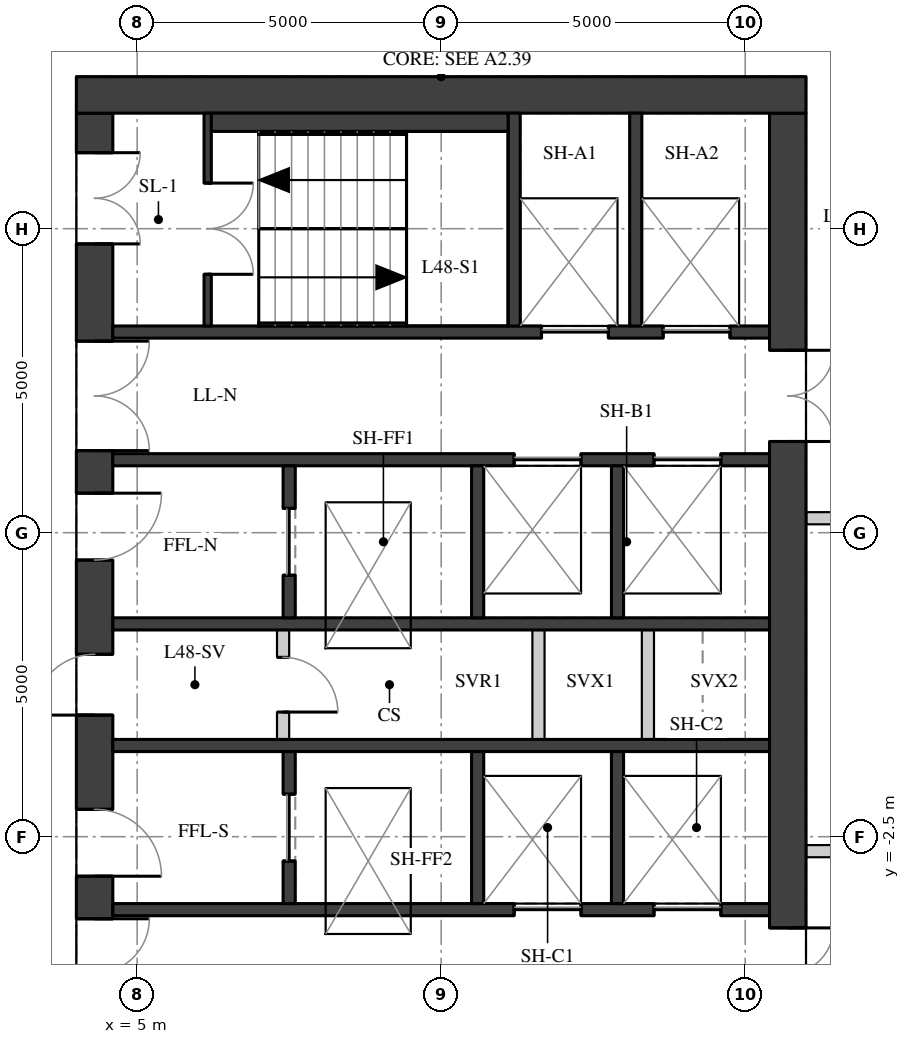
"""IFC4 building model, lengths in metres.
Left out: names, types, materials, properties, quantities, classifications, styles, units other than length and angle.
Written with IfcOpenShell. Run it as: python <this file> out.ifc"""

import sys

from ifc_helpers import new_model, si_unit, direction, frame, frame_2d, origin, place, context, subcontext, project, spatial, rectangle, extrude, element, fill, save


model = new_model("IFC4")
c1 = context("Model", 3, precision=1e-05, world=origin(), true_north=direction((0.0, 1.0)))
c2 = subcontext(c1, "Body", "Model", "MODEL_VIEW")
j1 = project(units=[si_unit("LENGTHUNIT", "METRE"), si_unit("PLANEANGLEUNIT", "RADIAN")], contexts=[c1])
p1 = place(None, origin())
s1 = spatial("IfcSite", under=j1, at=p1, CompositionType="ELEMENT")
p2 = place(p1, origin())
s2 = spatial("IfcBuilding", under=s1, at=p2, CompositionType="ELEMENT")
p3 = place(p2, frame((0.0, 0.0, 171.5)))
s3 = spatial("IfcBuildingStorey", under=s2, at=p3, CompositionType="ELEMENT", Elevation=171.5)
p4 = place(p3, frame((4.3, -9.4, 0.0), z_axis=(0.0, 0.0, 1.0), x_axis=(0.0, 1.0, 0.0)))
e1 = element("IfcWall", 1, at=p4, inside=s3, PredefinedType="SHEAR", context=c2, shape_type="SweptSolid", body=[
    extrude(rectangle(XDim=18.8, YDim=0.6, at=frame_2d((9.4, 0.0))), origin(), (0.0, 0.0, 1.0), 3.02),
])
p5 = place(p4, frame((0.65, 0.0, 0.0)))
e2 = element("IfcOpeningElement", 2, at=p5, cuts=e1, PredefinedType="OPENING", context=c2, shape_type="SweptSolid", body=[
    extrude(rectangle(XDim=1.5, YDim=2.1, at=frame_2d((0.75, 1.05))), frame((0.0, 0.31, 0.0), z_axis=(0.0, -1.0, 0.0), x_axis=(1.0, 0.0, 0.0)), (0.0, 0.0, 1.0), 0.62),
])
p6 = place(p4, frame((3.75, 0.0, 0.0)))
e3 = element("IfcOpeningElement", 3, at=p6, cuts=e1, PredefinedType="OPENING", context=c2, shape_type="SweptSolid", body=[
    extrude(rectangle(XDim=1.8, YDim=2.1, at=frame_2d((0.9, 1.05))), frame((0.0, 0.31, 0.0), z_axis=(0.0, -1.0, 0.0), x_axis=(1.0, 0.0, 0.0)), (0.0, 0.0, 1.0), 0.62),
])
p7 = place(p4, frame((6.25, 0.0, 0.0)))
e4 = element("IfcOpeningElement", 4, at=p7, cuts=e1, PredefinedType="OPENING", context=c2, shape_type="SweptSolid", body=[
    extrude(rectangle(XDim=1.1, YDim=2.1, at=frame_2d((0.55, 1.05))), frame((0.0, 0.31, 0.0), z_axis=(0.0, -1.0, 0.0), x_axis=(1.0, 0.0, 0.0)), (0.0, 0.0, 1.0), 0.62),
])
p8 = place(p4, frame((8.9, 0.0, 0.0)))
e5 = element("IfcOpeningElement", 5, at=p8, cuts=e1, PredefinedType="OPENING", context=c2, shape_type="SweptSolid", body=[
    extrude(rectangle(XDim=1.0, YDim=2.1, at=frame_2d((0.5, 1.05))), frame((0.0, 0.31, 0.0), z_axis=(0.0, -1.0, 0.0), x_axis=(1.0, 0.0, 0.0)), (0.0, 0.0, 1.0), 0.62),
])
p9 = place(p4, frame((11.45, 0.0, 0.0)))
e6 = element("IfcOpeningElement", 6, at=p9, cuts=e1, PredefinedType="OPENING", context=c2, shape_type="SweptSolid", body=[
    extrude(rectangle(XDim=1.1, YDim=2.1, at=frame_2d((0.55, 1.05))), frame((0.0, 0.31, 0.0), z_axis=(0.0, -1.0, 0.0), x_axis=(1.0, 0.0, 0.0)), (0.0, 0.0, 1.0), 0.62),
])
p10 = place(p4, frame((13.25, 0.0, 0.0)))
e7 = element("IfcOpeningElement", 7, at=p10, cuts=e1, PredefinedType="OPENING", context=c2, shape_type="SweptSolid", body=[
    extrude(rectangle(XDim=1.8, YDim=2.1, at=frame_2d((0.9, 1.05))), frame((0.0, 0.31, 0.0), z_axis=(0.0, -1.0, 0.0), x_axis=(1.0, 0.0, 0.0)), (0.0, 0.0, 1.0), 0.62),
])
p11 = place(p4, frame((16.65, 0.0, 0.0)))
e8 = element("IfcOpeningElement", 8, at=p11, cuts=e1, PredefinedType="OPENING", context=c2, shape_type="SweptSolid", body=[
    extrude(rectangle(XDim=1.5, YDim=2.1, at=frame_2d((0.75, 1.05))), frame((0.0, 0.31, 0.0), z_axis=(0.0, -1.0, 0.0), x_axis=(1.0, 0.0, 0.0)), (0.0, 0.0, 1.0), 0.62),
])
p12 = place(p3, frame((15.7, -9.4, 0.0), z_axis=(0.0, 0.0, 1.0), x_axis=(0.0, 1.0, 0.0)))
e9 = element("IfcWall", 9, at=p12, inside=s3, PredefinedType="SHEAR", context=c2, shape_type="SweptSolid", body=[
    extrude(rectangle(XDim=18.8, YDim=0.6, at=frame_2d((9.4, 0.0))), origin(), (0.0, 0.0, 1.0), 3.02),
])
p13 = place(p12, frame((13.4, 0.0, 0.0)))
e10 = element("IfcOpeningElement", 10, at=p13, cuts=e9, PredefinedType="OPENING", context=c2, shape_type="SweptSolid", body=[
    extrude(rectangle(XDim=1.5, YDim=2.1, at=frame_2d((0.75, 1.05))), frame((0.0, 0.31, 0.0), z_axis=(0.0, -1.0, 0.0), x_axis=(1.0, 0.0, 0.0)), (0.0, 0.0, 1.0), 0.62),
])
p14 = place(p12, frame((3.9, 0.0, 0.0)))
e11 = element("IfcOpeningElement", 11, at=p14, cuts=e9, PredefinedType="OPENING", context=c2, shape_type="SweptSolid", body=[
    extrude(rectangle(XDim=1.5, YDim=2.1, at=frame_2d((0.75, 1.05))), frame((0.0, 0.31, 0.0), z_axis=(0.0, -1.0, 0.0), x_axis=(1.0, 0.0, 0.0)), (0.0, 0.0, 1.0), 0.62),
])
p15 = place(p3, frame((4.0, 9.7, 0.0), z_axis=(0.0, 0.0, 1.0), x_axis=(1.0, 0.0, 0.0)))
e12 = element("IfcWall", 12, at=p15, inside=s3, PredefinedType="SHEAR", context=c2, shape_type="SweptSolid", body=[
    extrude(rectangle(XDim=12.0, YDim=0.6, at=frame_2d((6.0, 0.0))), origin(), (0.0, 0.0, 1.0), 3.02),
])
p16 = place(p3, frame((4.6, 5.8, 0.0), z_axis=(0.0, 0.0, 1.0), x_axis=(1.0, 0.0, 0.0)))
e13 = element("IfcWall", 13, at=p16, inside=s3, PredefinedType="SHEAR", context=c2, shape_type="SweptSolid", body=[
    extrude(rectangle(XDim=10.8, YDim=0.2, at=frame_2d((5.4, 0.0))), origin(), (0.0, 0.0, 1.0), 3.02),
])
p17 = place(p16, frame((7.05, 0.0, 0.0)))
e14 = element("IfcOpeningElement", 14, at=p17, cuts=e13, PredefinedType="OPENING", context=c2, shape_type="SweptSolid", body=[
    extrude(rectangle(XDim=1.1, YDim=2.1, at=frame_2d((0.55, 1.05))), frame((0.0, 0.11, 0.0), z_axis=(0.0, -1.0, 0.0), x_axis=(1.0, 0.0, 0.0)), (0.0, 0.0, 1.0), 0.22),
])
p18 = place(p16, frame((9.05, 0.0, 0.0)))
e15 = element("IfcOpeningElement", 15, at=p18, cuts=e13, PredefinedType="OPENING", context=c2, shape_type="SweptSolid", body=[
    extrude(rectangle(XDim=1.1, YDim=2.1, at=frame_2d((0.55, 1.05))), frame((0.0, 0.11, 0.0), z_axis=(0.0, -1.0, 0.0), x_axis=(1.0, 0.0, 0.0)), (0.0, 0.0, 1.0), 0.22),
])
p19 = place(p3, frame((4.6, 3.7, 0.0), z_axis=(0.0, 0.0, 1.0), x_axis=(1.0, 0.0, 0.0)))
e16 = element("IfcWall", 16, at=p19, inside=s3, PredefinedType="SHEAR", context=c2, shape_type="SweptSolid", body=[
    extrude(rectangle(XDim=10.8, YDim=0.2, at=frame_2d((5.4, 0.0))), origin(), (0.0, 0.0, 1.0), 3.02),
])
p20 = place(p19, frame((6.6, 0.0, 0.0)))
e17 = element("IfcOpeningElement", 17, at=p20, cuts=e16, PredefinedType="OPENING", context=c2, shape_type="SweptSolid", body=[
    extrude(rectangle(XDim=1.1, YDim=2.1, at=frame_2d((0.55, 1.05))), frame((0.0, 0.11, 0.0), z_axis=(0.0, -1.0, 0.0), x_axis=(1.0, 0.0, 0.0)), (0.0, 0.0, 1.0), 0.22),
])
p21 = place(p19, frame((8.9, 0.0, 0.0)))
e18 = element("IfcOpeningElement", 18, at=p21, cuts=e16, PredefinedType="OPENING", context=c2, shape_type="SweptSolid", body=[
    extrude(rectangle(XDim=1.1, YDim=2.1, at=frame_2d((0.55, 1.05))), frame((0.0, 0.11, 0.0), z_axis=(0.0, -1.0, 0.0), x_axis=(1.0, 0.0, 0.0)), (0.0, 0.0, 1.0), 0.22),
])
for number, where, z_axis, x_axis in (
    (19, (4.6, 1.0, 0.0), (0.0, 0.0, 1.0), (1.0, 0.0, 0.0)),
    (20, (4.6, -1.0, 0.0), (0.0, 0.0, 1.0), (1.0, 0.0, 0.0)),
):
    element("IfcWall", number, at=place(p3, frame(where, z_axis=z_axis, x_axis=x_axis)), inside=s3, PredefinedType="SHEAR", context=c2, shape_type="SweptSolid", body=[
        extrude(rectangle(XDim=10.8, YDim=0.2, at=frame_2d((5.4, 0.0))), origin(), (0.0, 0.0, 1.0), 3.02),
    ])
p22 = place(p3, frame((4.6, -3.7, 0.0), z_axis=(0.0, 0.0, 1.0), x_axis=(1.0, 0.0, 0.0)))
e21 = element("IfcWall", 21, at=p22, inside=s3, PredefinedType="SHEAR", context=c2, shape_type="SweptSolid", body=[
    extrude(rectangle(XDim=10.8, YDim=0.2, at=frame_2d((5.4, 0.0))), origin(), (0.0, 0.0, 1.0), 3.02),
])
p23 = place(p22, frame((6.6, 0.0, 0.0)))
e22 = element("IfcOpeningElement", 22, at=p23, cuts=e21, PredefinedType="OPENING", context=c2, shape_type="SweptSolid", body=[
    extrude(rectangle(XDim=1.1, YDim=2.1, at=frame_2d((0.55, 1.05))), frame((0.0, 0.11, 0.0), z_axis=(0.0, -1.0, 0.0), x_axis=(1.0, 0.0, 0.0)), (0.0, 0.0, 1.0), 0.22),
])
p24 = place(p22, frame((8.9, 0.0, 0.0)))
e23 = element("IfcOpeningElement", 23, at=p24, cuts=e21, PredefinedType="OPENING", context=c2, shape_type="SweptSolid", body=[
    extrude(rectangle(XDim=1.1, YDim=2.1, at=frame_2d((0.55, 1.05))), frame((0.0, 0.11, 0.0), z_axis=(0.0, -1.0, 0.0), x_axis=(1.0, 0.0, 0.0)), (0.0, 0.0, 1.0), 0.22),
])
for number, where, z_axis, x_axis in (
    (24, (11.2, 5.9, 0.0), (0.0, 0.0, 1.0), (0.0, 1.0, 0.0)),
    (25, (13.2, 5.9, 0.0), (0.0, 0.0, 1.0), (0.0, 1.0, 0.0)),
):
    element("IfcWall", number, at=place(p3, frame(where, z_axis=z_axis, x_axis=x_axis)), inside=s3, PredefinedType="SHEAR", context=c2, shape_type="SweptSolid", body=[
        extrude(rectangle(XDim=3.5, YDim=0.2, at=frame_2d((1.75, 0.0))), origin(), (0.0, 0.0, 1.0), 3.02),
    ])
p25 = place(p3, frame((7.5, 1.1, 0.0), z_axis=(0.0, 0.0, 1.0), x_axis=(0.0, 1.0, 0.0)))
e26 = element("IfcWall", 26, at=p25, inside=s3, PredefinedType="SHEAR", context=c2, shape_type="SweptSolid", body=[
    extrude(rectangle(XDim=2.5, YDim=0.2, at=frame_2d((1.25, 0.0))), origin(), (0.0, 0.0, 1.0), 3.02),
])
p26 = place(p25, frame((0.7, 0.0, 0.0)))
e27 = element("IfcOpeningElement", 27, at=p26, cuts=e26, PredefinedType="OPENING", context=c2, shape_type="SweptSolid", body=[
    extrude(rectangle(XDim=1.1, YDim=2.1, at=frame_2d((0.55, 1.05))), frame((0.0, 0.11, 0.0), z_axis=(0.0, -1.0, 0.0), x_axis=(1.0, 0.0, 0.0)), (0.0, 0.0, 1.0), 0.22),
])
p27 = place(p3, frame((7.5, -3.6, 0.0), z_axis=(0.0, 0.0, 1.0), x_axis=(0.0, 1.0, 0.0)))
e28 = element("IfcWall", 28, at=p27, inside=s3, PredefinedType="SHEAR", context=c2, shape_type="SweptSolid", body=[
    extrude(rectangle(XDim=2.5, YDim=0.2, at=frame_2d((1.25, 0.0))), origin(), (0.0, 0.0, 1.0), 3.02),
])
p28 = place(p27, frame((0.7, 0.0, 0.0)))
e29 = element("IfcOpeningElement", 29, at=p28, cuts=e28, PredefinedType="OPENING", context=c2, shape_type="SweptSolid", body=[
    extrude(rectangle(XDim=1.1, YDim=2.1, at=frame_2d((0.55, 1.05))), frame((0.0, 0.11, 0.0), z_axis=(0.0, -1.0, 0.0), x_axis=(1.0, 0.0, 0.0)), (0.0, 0.0, 1.0), 0.22),
])
for number, where, z_axis, x_axis in (
    (30, (10.6, 1.1, 0.0), (0.0, 0.0, 1.0), (0.0, 1.0, 0.0)),
    (31, (10.6, -3.6, 0.0), (0.0, 0.0, 1.0), (0.0, 1.0, 0.0)),
    (32, (12.9, 1.1, 0.0), (0.0, 0.0, 1.0), (0.0, 1.0, 0.0)),
    (33, (12.9, -3.6, 0.0), (0.0, 0.0, 1.0), (0.0, 1.0, 0.0)),
):
    element("IfcWall", number, at=place(p3, frame(where, z_axis=z_axis, x_axis=x_axis)), inside=s3, PredefinedType="SHEAR", context=c2, shape_type="SweptSolid", body=[
        extrude(rectangle(XDim=2.5, YDim=0.2, at=frame_2d((1.25, 0.0))), origin(), (0.0, 0.0, 1.0), 3.02),
    ])
p29 = place(p3, frame((6.16, 5.9, 0.0), z_axis=(0.0, 0.0, 1.0), x_axis=(0.0, 1.0, 0.0)))
e34 = element("IfcWall", 34, at=p29, inside=s3, PredefinedType="SHEAR", context=c2, shape_type="SweptSolid", body=[
    extrude(rectangle(XDim=3.5, YDim=0.12, at=frame_2d((1.75, 0.0))), origin(), (0.0, 0.0, 1.0), 3.02),
])
p30 = place(p29, frame((0.85, 0.0, 0.0)))
e35 = element("IfcOpeningElement", 35, at=p30, cuts=e34, PredefinedType="OPENING", context=c2, shape_type="SweptSolid", body=[
    extrude(rectangle(XDim=1.5, YDim=2.1, at=frame_2d((0.75, 1.05))), frame((0.0, 0.07, 0.0), z_axis=(0.0, -1.0, 0.0), x_axis=(1.0, 0.0, 0.0)), (0.0, 0.0, 1.0), 0.14),
])
p31 = place(p3, frame((7.4, -0.9, 0.0), z_axis=(0.0, 0.0, 1.0), x_axis=(0.0, 1.0, 0.0)))
e36 = element("IfcWall", 36, at=p31, inside=s3, PredefinedType="PARTITIONING", context=c2, shape_type="SweptSolid", body=[
    extrude(rectangle(XDim=1.8, YDim=0.2, at=frame_2d((0.9, 0.0))), origin(), (0.0, 0.0, 1.0), 3.02),
])
p32 = place(p31, frame((0.45, 0.0, 0.0)))
e37 = element("IfcOpeningElement", 37, at=p32, cuts=e36, PredefinedType="OPENING", context=c2, shape_type="SweptSolid", body=[
    extrude(rectangle(XDim=0.9, YDim=2.1, at=frame_2d((0.45, 1.05))), frame((0.0, 0.11, 0.0), z_axis=(0.0, -1.0, 0.0), x_axis=(1.0, 0.0, 0.0)), (0.0, 0.0, 1.0), 0.22),
])
for number, where, z_axis, x_axis in (
    (38, (11.6, -0.9, 0.0), (0.0, 0.0, 1.0), (0.0, 1.0, 0.0)),
    (39, (13.4, -0.9, 0.0), (0.0, 0.0, 1.0), (0.0, 1.0, 0.0)),
):
    element("IfcWall", number, at=place(p3, frame(where, z_axis=z_axis, x_axis=x_axis)), inside=s3, PredefinedType="PARTITIONING", context=c2, shape_type="SweptSolid", body=[
        extrude(rectangle(XDim=1.8, YDim=0.2, at=frame_2d((0.9, 0.0))), origin(), (0.0, 0.0, 1.0), 3.02),
    ])
p33 = place(p3, frame((6.22, 9.25, 0.0), z_axis=(0.0, 0.0, 1.0), x_axis=(1.0, 0.0, 0.0)))
e40 = element("IfcWall", 40, at=p33, inside=s3, PredefinedType="PARTITIONING", context=c2, shape_type="SweptSolid", body=[
    extrude(rectangle(XDim=4.88, YDim=0.3, at=frame_2d((2.44, 0.0))), origin(), (0.0, 0.0, 1.0), 3.02),
])
p34 = place(p3, frame((17.5, 2.738, 0.0), z_axis=(0.0, 0.0, 1.0), x_axis=(-1.0, 0.0, 0.0)))
e41 = element("IfcWall", 41, at=p34, inside=s3, PredefinedType="PARTITIONING", context=c2, shape_type="SweptSolid", body=[
    extrude(rectangle(XDim=1.496, YDim=0.2, at=frame_2d((0.748, 0.0))), origin(), (0.0, 0.0, 1.0), 3.02),
])
p35 = place(p3, frame((16.004, -2.738, 0.0), z_axis=(0.0, 0.0, 1.0), x_axis=(1.0, 0.0, 0.0)))
e42 = element("IfcWall", 42, at=p35, inside=s3, PredefinedType="PARTITIONING", context=c2, shape_type="SweptSolid", body=[
    extrude(rectangle(XDim=1.596, YDim=0.2, at=frame_2d((0.798, 0.0))), origin(), (0.0, 0.0, 1.0), 3.02),
])
p36 = place(p6, origin())
e43 = element("IfcDoor", 43, at=p36, inside=s3, OperationType="DOUBLE_DOOR_SINGLE_SWING", PredefinedType="DOOR", context=c2, shape_type="SweptSolid", body=[
    extrude(rectangle(XDim=1.8, YDim=2.1, at=frame_2d((0.9, 1.05))), frame((0.0, 0.025, 0.0), z_axis=(0.0, -1.0, 0.0), x_axis=(1.0, 0.0, 0.0)), (0.0, 0.0, 1.0), 0.05),
])
fill(e3, e43)
p37 = place(p7, origin())
e44 = element("IfcDoor", 44, at=p37, inside=s3, OperationType="SINGLE_SWING_RIGHT", PredefinedType="DOOR", context=c2, shape_type="SweptSolid", body=[
    extrude(rectangle(XDim=1.1, YDim=2.1, at=frame_2d((0.55, 1.05))), frame((0.0, 0.025, 0.0), z_axis=(0.0, -1.0, 0.0), x_axis=(1.0, 0.0, 0.0)), (0.0, 0.0, 1.0), 0.05),
])
fill(e4, e44)
p38 = place(p8, origin())
e45 = element("IfcDoor", 45, at=p38, inside=s3, OperationType="SINGLE_SWING_LEFT", PredefinedType="DOOR", context=c2, shape_type="SweptSolid", body=[
    extrude(rectangle(XDim=1.0, YDim=2.1, at=frame_2d((0.5, 1.05))), frame((0.0, 0.025, 0.0), z_axis=(0.0, -1.0, 0.0), x_axis=(1.0, 0.0, 0.0)), (0.0, 0.0, 1.0), 0.05),
])
fill(e5, e45)
p39 = place(p9, origin())
e46 = element("IfcDoor", 46, at=p39, inside=s3, OperationType="SINGLE_SWING_LEFT", PredefinedType="DOOR", context=c2, shape_type="SweptSolid", body=[
    extrude(rectangle(XDim=1.1, YDim=2.1, at=frame_2d((0.55, 1.05))), frame((0.0, 0.025, 0.0), z_axis=(0.0, -1.0, 0.0), x_axis=(1.0, 0.0, 0.0)), (0.0, 0.0, 1.0), 0.05),
])
fill(e6, e46)
p40 = place(p10, origin())
e47 = element("IfcDoor", 47, at=p40, inside=s3, OperationType="DOUBLE_DOOR_SINGLE_SWING", PredefinedType="DOOR", context=c2, shape_type="SweptSolid", body=[
    extrude(rectangle(XDim=1.8, YDim=2.1, at=frame_2d((0.9, 1.05))), frame((0.0, 0.025, 0.0), z_axis=(0.0, -1.0, 0.0), x_axis=(1.0, 0.0, 0.0)), (0.0, 0.0, 1.0), 0.05),
])
fill(e7, e47)
p41 = place(p11, origin())
e48 = element("IfcDoor", 48, at=p41, inside=s3, OperationType="DOUBLE_DOOR_SINGLE_SWING", PredefinedType="DOOR", context=c2, shape_type="SweptSolid", body=[
    extrude(rectangle(XDim=1.5, YDim=2.1, at=frame_2d((0.75, 1.05))), frame((0.0, 0.025, 0.0), z_axis=(0.0, -1.0, 0.0), x_axis=(1.0, 0.0, 0.0)), (0.0, 0.0, 1.0), 0.05),
])
fill(e8, e48)
p42 = place(p13, origin())
e49 = element("IfcDoor", 49, at=p42, inside=s3, OperationType="DOUBLE_DOOR_SINGLE_SWING", PredefinedType="DOOR", context=c2, shape_type="SweptSolid", body=[
    extrude(rectangle(XDim=1.5, YDim=2.1, at=frame_2d((0.75, 1.05))), frame((0.0, 0.025, 0.0), z_axis=(0.0, -1.0, 0.0), x_axis=(1.0, 0.0, 0.0)), (0.0, 0.0, 1.0), 0.05),
])
fill(e10, e49)
p43 = place(p14, origin())
e50 = element("IfcDoor", 50, at=p43, inside=s3, OperationType="DOUBLE_DOOR_SINGLE_SWING", PredefinedType="DOOR", context=c2, shape_type="SweptSolid", body=[
    extrude(rectangle(XDim=1.5, YDim=2.1, at=frame_2d((0.75, 1.05))), frame((0.0, 0.025, 0.0), z_axis=(0.0, -1.0, 0.0), x_axis=(1.0, 0.0, 0.0)), (0.0, 0.0, 1.0), 0.05),
])
fill(e11, e50)
p44 = place(p30, origin())
e51 = element("IfcDoor", 51, at=p44, inside=s3, OperationType="DOUBLE_DOOR_SINGLE_SWING", PredefinedType="DOOR", context=c2, shape_type="SweptSolid", body=[
    extrude(rectangle(XDim=1.5, YDim=2.1, at=frame_2d((0.75, 1.05))), frame((0.0, 0.025, 0.0), z_axis=(0.0, -1.0, 0.0), x_axis=(1.0, 0.0, 0.0)), (0.0, 0.0, 1.0), 0.05),
])
fill(e35, e51)
p45 = place(p17, origin())
e52 = element("IfcDoor", 52, at=p45, inside=s3, OperationType="DOUBLE_DOOR_SLIDING", PredefinedType="DOOR", context=c2, shape_type="SweptSolid", body=[
    extrude(rectangle(XDim=1.1, YDim=2.1, at=frame_2d((0.55, 1.05))), frame((0.0, 0.025, 0.0), z_axis=(0.0, -1.0, 0.0), x_axis=(1.0, 0.0, 0.0)), (0.0, 0.0, 1.0), 0.05),
])
fill(e14, e52)
p46 = place(p18, origin())
e53 = element("IfcDoor", 53, at=p46, inside=s3, OperationType="DOUBLE_DOOR_SLIDING", PredefinedType="DOOR", context=c2, shape_type="SweptSolid", body=[
    extrude(rectangle(XDim=1.1, YDim=2.1, at=frame_2d((0.55, 1.05))), frame((0.0, 0.025, 0.0), z_axis=(0.0, -1.0, 0.0), x_axis=(1.0, 0.0, 0.0)), (0.0, 0.0, 1.0), 0.05),
])
fill(e15, e53)
p47 = place(p20, origin())
e54 = element("IfcDoor", 54, at=p47, inside=s3, OperationType="DOUBLE_DOOR_SLIDING", PredefinedType="DOOR", context=c2, shape_type="SweptSolid", body=[
    extrude(rectangle(XDim=1.1, YDim=2.1, at=frame_2d((0.55, 1.05))), frame((0.0, 0.025, 0.0), z_axis=(0.0, -1.0, 0.0), x_axis=(1.0, 0.0, 0.0)), (0.0, 0.0, 1.0), 0.05),
])
fill(e17, e54)
p48 = place(p21, origin())
e55 = element("IfcDoor", 55, at=p48, inside=s3, OperationType="DOUBLE_DOOR_SLIDING", PredefinedType="DOOR", context=c2, shape_type="SweptSolid", body=[
    extrude(rectangle(XDim=1.1, YDim=2.1, at=frame_2d((0.55, 1.05))), frame((0.0, 0.025, 0.0), z_axis=(0.0, -1.0, 0.0), x_axis=(1.0, 0.0, 0.0)), (0.0, 0.0, 1.0), 0.05),
])
fill(e18, e55)
p49 = place(p23, origin())
e56 = element("IfcDoor", 56, at=p49, inside=s3, OperationType="DOUBLE_DOOR_SLIDING", PredefinedType="DOOR", context=c2, shape_type="SweptSolid", body=[
    extrude(rectangle(XDim=1.1, YDim=2.1, at=frame_2d((0.55, 1.05))), frame((0.0, 0.025, 0.0), z_axis=(0.0, -1.0, 0.0), x_axis=(1.0, 0.0, 0.0)), (0.0, 0.0, 1.0), 0.05),
])
fill(e22, e56)
p50 = place(p24, origin())
e57 = element("IfcDoor", 57, at=p50, inside=s3, OperationType="DOUBLE_DOOR_SLIDING", PredefinedType="DOOR", context=c2, shape_type="SweptSolid", body=[
    extrude(rectangle(XDim=1.1, YDim=2.1, at=frame_2d((0.55, 1.05))), frame((0.0, 0.025, 0.0), z_axis=(0.0, -1.0, 0.0), x_axis=(1.0, 0.0, 0.0)), (0.0, 0.0, 1.0), 0.05),
])
fill(e23, e57)
p51 = place(p26, origin())
e58 = element("IfcDoor", 58, at=p51, inside=s3, OperationType="DOUBLE_DOOR_SLIDING", PredefinedType="DOOR", context=c2, shape_type="SweptSolid", body=[
    extrude(rectangle(XDim=1.1, YDim=2.1, at=frame_2d((0.55, 1.05))), frame((0.0, 0.025, 0.0), z_axis=(0.0, -1.0, 0.0), x_axis=(1.0, 0.0, 0.0)), (0.0, 0.0, 1.0), 0.05),
])
fill(e27, e58)
p52 = place(p28, origin())
e59 = element("IfcDoor", 59, at=p52, inside=s3, OperationType="DOUBLE_DOOR_SLIDING", PredefinedType="DOOR", context=c2, shape_type="SweptSolid", body=[
    extrude(rectangle(XDim=1.1, YDim=2.1, at=frame_2d((0.55, 1.05))), frame((0.0, 0.025, 0.0), z_axis=(0.0, -1.0, 0.0), x_axis=(1.0, 0.0, 0.0)), (0.0, 0.0, 1.0), 0.05),
])
fill(e29, e59)
p53 = place(p32, origin())
e60 = element("IfcDoor", 60, at=p53, inside=s3, OperationType="SINGLE_SWING_RIGHT", PredefinedType="DOOR", context=c2, shape_type="SweptSolid", body=[
    extrude(rectangle(XDim=0.9, YDim=2.1, at=frame_2d((0.45, 1.05))), frame((0.0, 0.025, 0.0), z_axis=(0.0, -1.0, 0.0), x_axis=(1.0, 0.0, 0.0)), (0.0, 0.0, 1.0), 0.05),
])
fill(e37, e60)
save(model, sys.argv[1])
